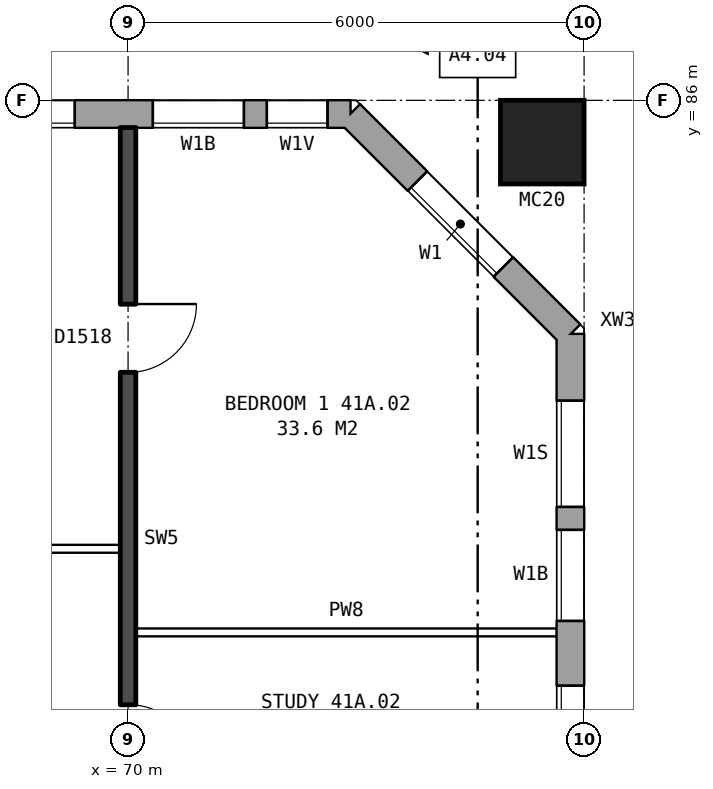
"""IFC4 building model, lengths in metres.
Left out: names, types, materials, properties, quantities, classifications, styles, units other than length and angle.
Written with IfcOpenShell. Run it as: python <this file> out.ifc"""

import sys

from ifc_helpers import new_model, si_unit, direction, frame, frame_2d, origin, origin_2d, place, context, subcontext, project, spatial, rectangle, hollow_rectangle, extrude, element, fill, save


model = new_model("IFC4")
c1 = context("Model", 3, precision=1e-05, world=origin(), true_north=direction((0.0, 1.0)))
c2 = subcontext(c1, "Body", "Model", "MODEL_VIEW")
j1 = project(units=[si_unit("LENGTHUNIT", "METRE"), si_unit("PLANEANGLEUNIT", "RADIAN")], contexts=[c1])
p1 = place(None, origin())
s1 = spatial("IfcSite", under=j1, at=p1, CompositionType="ELEMENT")
p2 = place(p1, origin())
s2 = spatial("IfcBuilding", under=s1, at=p2, CompositionType="ELEMENT")
p3 = place(p2, frame((0.0, 0.0, 148.5)))
s3 = spatial("IfcBuildingStorey", under=s2, at=p3, CompositionType="ELEMENT", Elevation=148.5)
p4 = place(p3, frame((75.45, 85.45, 0.0), z_axis=(0.0, 0.0, 1.0), x_axis=(1.0, 0.0, 0.0)))
e1 = element("IfcColumn", 1, at=p4, inside=s3, PredefinedType="COLUMN", context=c2, shape_type="SweptSolid", body=[
    extrude(hollow_rectangle(XDim=1.1, YDim=1.1, WallThickness=0.06, at=origin_2d()), origin(), (0.0, 0.0, 1.0), 3.1),
])
p5 = place(p3, frame((75.82, 57.075, 0.0), z_axis=(0.0, 0.0, 1.0), x_axis=(0.0, 1.0, 0.0)))
e2 = element("IfcWall", 2, at=p5, inside=s3, PredefinedType="STANDARD", context=c2, shape_type="SweptSolid", body=[
    extrude(rectangle(XDim=25.851, YDim=0.36, at=frame_2d((12.925, 0.0))), origin(), (0.0, 0.0, 1.0), 2.85),
])
p6 = place(p5, frame((1.375, 0.0, 0.8)))
e3 = element("IfcOpeningElement", 3, at=p6, cuts=e2, PredefinedType="OPENING", context=c2, shape_type="SweptSolid", body=[
    extrude(rectangle(XDim=1.0, YDim=1.2, at=frame_2d((0.5, 0.6))), frame((0.0, 0.19, 0.0), z_axis=(0.0, -1.0, 0.0), x_axis=(1.0, 0.0, 0.0)), (0.0, 0.0, 1.0), 0.38),
])
p7 = place(p5, frame((4.625, 0.0, 0.8)))
e4 = element("IfcOpeningElement", 4, at=p7, cuts=e2, PredefinedType="OPENING", context=c2, shape_type="SweptSolid", body=[
    extrude(rectangle(XDim=1.6, YDim=1.8, at=frame_2d((0.8, 0.9))), frame((0.0, 0.19, 0.0), z_axis=(0.0, -1.0, 0.0), x_axis=(1.0, 0.0, 0.0)), (0.0, 0.0, 1.0), 0.38),
])
p8 = place(p5, frame((19.625, 0.0, 0.8)))
e5 = element("IfcOpeningElement", 5, at=p8, cuts=e2, PredefinedType="OPENING", context=c2, shape_type="SweptSolid", body=[
    extrude(rectangle(XDim=1.6, YDim=1.8, at=frame_2d((0.8, 0.9))), frame((0.0, 0.19, 0.0), z_axis=(0.0, -1.0, 0.0), x_axis=(1.0, 0.0, 0.0)), (0.0, 0.0, 1.0), 0.38),
])
p9 = place(p5, frame((22.075, 0.0, 0.8)))
e6 = element("IfcOpeningElement", 6, at=p9, cuts=e2, PredefinedType="OPENING", context=c2, shape_type="SweptSolid", body=[
    extrude(rectangle(XDim=1.2, YDim=1.8, at=frame_2d((0.6, 0.9))), frame((0.0, 0.19, 0.0), z_axis=(0.0, -1.0, 0.0), x_axis=(1.0, 0.0, 0.0)), (0.0, 0.0, 1.0), 0.38),
])
p10 = place(p5, frame((2.675, 0.0, 0.8)))
e7 = element("IfcOpeningElement", 7, at=p10, cuts=e2, PredefinedType="OPENING", context=c2, shape_type="SweptSolid", body=[
    extrude(rectangle(XDim=1.4, YDim=1.8, at=frame_2d((0.7, 0.9))), frame((0.0, 0.19, 0.0), z_axis=(0.0, -1.0, 0.0), x_axis=(1.0, 0.0, 0.0)), (0.0, 0.0, 1.0), 0.38),
])
p11 = place(p5, frame((23.575, 0.0, 0.8)))
e8 = element("IfcOpeningElement", 8, at=p11, cuts=e2, PredefinedType="OPENING", context=c2, shape_type="SweptSolid", body=[
    extrude(rectangle(XDim=1.4, YDim=0.9, at=frame_2d((0.7, 0.45))), frame((0.0, 0.19, 0.0), z_axis=(0.0, -1.0, 0.0), x_axis=(1.0, 0.0, 0.0)), (0.0, 0.0, 1.0), 0.38),
])
p12 = place(p3, frame((75.82, 82.925, 0.0), z_axis=(0.0, 0.0, 1.0), x_axis=(-0.707106781187, 0.707106781187, 0.0)))
e9 = element("IfcWall", 9, at=p12, inside=s3, PredefinedType="STANDARD", context=c2, shape_type="SweptSolid", body=[
    extrude(rectangle(XDim=4.094, YDim=0.36, at=frame_2d((2.047, 0.0))), origin(), (0.0, 0.0, 1.0), 2.85),
])
p13 = place(p12, frame((1.247, 0.0, 0.8)))
e10 = element("IfcOpeningElement", 10, at=p13, cuts=e9, PredefinedType="OPENING", context=c2, shape_type="SweptSolid", body=[
    extrude(rectangle(XDim=1.6, YDim=1.8, at=frame_2d((0.8, 0.9))), frame((0.0, 0.19, 0.0), z_axis=(0.0, -1.0, 0.0), x_axis=(1.0, 0.0, 0.0)), (0.0, 0.0, 1.0), 0.38),
])
p14 = place(p3, frame((72.925, 85.82, 0.0), z_axis=(0.0, 0.0, 1.0), x_axis=(-1.0, 0.0, 0.0)))
e11 = element("IfcWall", 11, at=p14, inside=s3, PredefinedType="STANDARD", context=c2, shape_type="SweptSolid", body=[
    extrude(rectangle(XDim=41.351, YDim=0.36, at=frame_2d((20.675, 0.0))), origin(), (0.0, 0.0, 1.0), 2.85),
])
p15 = place(p14, frame((0.3, 0.0, 0.8)))
e12 = element("IfcOpeningElement", 12, at=p15, cuts=e11, PredefinedType="OPENING", context=c2, shape_type="SweptSolid", body=[
    extrude(rectangle(XDim=0.8, YDim=0.9, at=frame_2d((0.4, 0.45))), frame((0.0, 0.19, 0.0), z_axis=(0.0, -1.0, 0.0), x_axis=(1.0, 0.0, 0.0)), (0.0, 0.0, 1.0), 0.38),
])
p16 = place(p14, frame((3.625, 0.0, 0.8)))
e13 = element("IfcOpeningElement", 13, at=p16, cuts=e11, PredefinedType="OPENING", context=c2, shape_type="SweptSolid", body=[
    extrude(rectangle(XDim=1.6, YDim=1.8, at=frame_2d((0.8, 0.9))), frame((0.0, 0.19, 0.0), z_axis=(0.0, -1.0, 0.0), x_axis=(1.0, 0.0, 0.0)), (0.0, 0.0, 1.0), 0.38),
])
p17 = place(p14, frame((6.625, 0.0, 0.8)))
e14 = element("IfcOpeningElement", 14, at=p17, cuts=e11, PredefinedType="OPENING", context=c2, shape_type="SweptSolid", body=[
    extrude(rectangle(XDim=1.6, YDim=1.8, at=frame_2d((0.8, 0.9))), frame((0.0, 0.19, 0.0), z_axis=(0.0, -1.0, 0.0), x_axis=(1.0, 0.0, 0.0)), (0.0, 0.0, 1.0), 0.38),
])
p18 = place(p14, frame((9.625, 0.0, 0.8)))
e15 = element("IfcOpeningElement", 15, at=p18, cuts=e11, PredefinedType="OPENING", context=c2, shape_type="SweptSolid", body=[
    extrude(rectangle(XDim=1.6, YDim=1.8, at=frame_2d((0.8, 0.9))), frame((0.0, 0.19, 0.0), z_axis=(0.0, -1.0, 0.0), x_axis=(1.0, 0.0, 0.0)), (0.0, 0.0, 1.0), 0.38),
])
p19 = place(p14, frame((12.625, 0.0, 0.8)))
e16 = element("IfcOpeningElement", 16, at=p19, cuts=e11, PredefinedType="OPENING", context=c2, shape_type="SweptSolid", body=[
    extrude(rectangle(XDim=1.6, YDim=1.8, at=frame_2d((0.8, 0.9))), frame((0.0, 0.19, 0.0), z_axis=(0.0, -1.0, 0.0), x_axis=(1.0, 0.0, 0.0)), (0.0, 0.0, 1.0), 0.38),
])
p20 = place(p14, frame((15.625, 0.0, 0.8)))
e17 = element("IfcOpeningElement", 17, at=p20, cuts=e11, PredefinedType="OPENING", context=c2, shape_type="SweptSolid", body=[
    extrude(rectangle(XDim=1.6, YDim=1.8, at=frame_2d((0.8, 0.9))), frame((0.0, 0.19, 0.0), z_axis=(0.0, -1.0, 0.0), x_axis=(1.0, 0.0, 0.0)), (0.0, 0.0, 1.0), 0.38),
])
p21 = place(p14, frame((18.625, 0.0, 0.8)))
e18 = element("IfcOpeningElement", 18, at=p21, cuts=e11, PredefinedType="OPENING", context=c2, shape_type="SweptSolid", body=[
    extrude(rectangle(XDim=1.6, YDim=1.8, at=frame_2d((0.8, 0.9))), frame((0.0, 0.19, 0.0), z_axis=(0.0, -1.0, 0.0), x_axis=(1.0, 0.0, 0.0)), (0.0, 0.0, 1.0), 0.38),
])
p22 = place(p14, frame((21.625, 0.0, 0.8)))
e19 = element("IfcOpeningElement", 19, at=p22, cuts=e11, PredefinedType="OPENING", context=c2, shape_type="SweptSolid", body=[
    extrude(rectangle(XDim=1.6, YDim=1.8, at=frame_2d((0.8, 0.9))), frame((0.0, 0.19, 0.0), z_axis=(0.0, -1.0, 0.0), x_axis=(1.0, 0.0, 0.0)), (0.0, 0.0, 1.0), 0.38),
])
p23 = place(p14, frame((24.625, 0.0, 0.8)))
e20 = element("IfcOpeningElement", 20, at=p23, cuts=e11, PredefinedType="OPENING", context=c2, shape_type="SweptSolid", body=[
    extrude(rectangle(XDim=1.6, YDim=1.8, at=frame_2d((0.8, 0.9))), frame((0.0, 0.19, 0.0), z_axis=(0.0, -1.0, 0.0), x_axis=(1.0, 0.0, 0.0)), (0.0, 0.0, 1.0), 0.38),
])
p24 = place(p14, frame((27.625, 0.0, 0.8)))
e21 = element("IfcOpeningElement", 21, at=p24, cuts=e11, PredefinedType="OPENING", context=c2, shape_type="SweptSolid", body=[
    extrude(rectangle(XDim=1.6, YDim=1.8, at=frame_2d((0.8, 0.9))), frame((0.0, 0.19, 0.0), z_axis=(0.0, -1.0, 0.0), x_axis=(1.0, 0.0, 0.0)), (0.0, 0.0, 1.0), 0.38),
])
p25 = place(p14, frame((30.625, 0.0, 0.8)))
e22 = element("IfcOpeningElement", 22, at=p25, cuts=e11, PredefinedType="OPENING", context=c2, shape_type="SweptSolid", body=[
    extrude(rectangle(XDim=1.6, YDim=1.8, at=frame_2d((0.8, 0.9))), frame((0.0, 0.19, 0.0), z_axis=(0.0, -1.0, 0.0), x_axis=(1.0, 0.0, 0.0)), (0.0, 0.0, 1.0), 0.38),
])
p26 = place(p14, frame((33.625, 0.0, 0.8)))
e23 = element("IfcOpeningElement", 23, at=p26, cuts=e11, PredefinedType="OPENING", context=c2, shape_type="SweptSolid", body=[
    extrude(rectangle(XDim=1.6, YDim=1.8, at=frame_2d((0.8, 0.9))), frame((0.0, 0.19, 0.0), z_axis=(0.0, -1.0, 0.0), x_axis=(1.0, 0.0, 0.0)), (0.0, 0.0, 1.0), 0.38),
])
p27 = place(p14, frame((36.625, 0.0, 0.8)))
e24 = element("IfcOpeningElement", 24, at=p27, cuts=e11, PredefinedType="OPENING", context=c2, shape_type="SweptSolid", body=[
    extrude(rectangle(XDim=1.6, YDim=1.8, at=frame_2d((0.8, 0.9))), frame((0.0, 0.19, 0.0), z_axis=(0.0, -1.0, 0.0), x_axis=(1.0, 0.0, 0.0)), (0.0, 0.0, 1.0), 0.38),
])
p28 = place(p14, frame((1.4, 0.0, 0.8)))
e25 = element("IfcOpeningElement", 25, at=p28, cuts=e11, PredefinedType="OPENING", context=c2, shape_type="SweptSolid", body=[
    extrude(rectangle(XDim=1.2, YDim=1.8, at=frame_2d((0.6, 0.9))), frame((0.0, 0.19, 0.0), z_axis=(0.0, -1.0, 0.0), x_axis=(1.0, 0.0, 0.0)), (0.0, 0.0, 1.0), 0.38),
])
p29 = place(p3, frame((70.1, 79.0, 0.0), z_axis=(0.0, 0.0, 1.0), x_axis=(1.0, 0.0, 0.0)))
e26 = element("IfcWall", 26, at=p29, inside=s3, PredefinedType="PARTITIONING", context=c2, shape_type="SweptSolid", body=[
    extrude(rectangle(XDim=5.54, YDim=0.1, at=frame_2d((2.77, 0.0))), origin(), (0.0, 0.0, 1.0), 2.85),
])
p30 = place(p3, frame((64.1, 80.1, 0.0), z_axis=(0.0, 0.0, 1.0), x_axis=(1.0, 0.0, 0.0)))
e27 = element("IfcWall", 27, at=p30, inside=s3, PredefinedType="PARTITIONING", context=c2, shape_type="SweptSolid", body=[
    extrude(rectangle(XDim=5.8, YDim=0.1, at=frame_2d((2.9, 0.0))), origin(), (0.0, 0.0, 1.0), 2.85),
])
p31 = place(p30, frame((3.6, 0.0, 0.0)))
e28 = element("IfcOpeningElement", 28, at=p31, cuts=e27, PredefinedType="OPENING", context=c2, shape_type="SweptSolid", body=[
    extrude(rectangle(XDim=0.9, YDim=2.1, at=frame_2d((0.45, 1.05))), frame((0.0, 0.06, 0.0), z_axis=(0.0, -1.0, 0.0), x_axis=(1.0, 0.0, 0.0)), (0.0, 0.0, 1.0), 0.12),
])
p32 = place(p30, frame((0.7, 0.0, 0.0)))
e29 = element("IfcOpeningElement", 29, at=p32, cuts=e27, PredefinedType="OPENING", context=c2, shape_type="SweptSolid", body=[
    extrude(rectangle(XDim=0.9, YDim=2.1, at=frame_2d((0.45, 1.05))), frame((0.0, 0.06, 0.0), z_axis=(0.0, -1.0, 0.0), x_axis=(1.0, 0.0, 0.0)), (0.0, 0.0, 1.0), 0.12),
])
p33 = place(p3, frame((70.0, 76.2, 0.0), z_axis=(0.0, 0.0, 1.0), x_axis=(0.0, 1.0, 0.0)))
e30 = element("IfcWall", 30, at=p33, inside=s3, PredefinedType="SOLIDWALL", context=c2, shape_type="SweptSolid", body=[
    extrude(rectangle(XDim=9.44, YDim=0.2, at=frame_2d((4.72, 0.0))), origin(), (0.0, 0.0, 1.0), 2.85),
])
p34 = place(p33, frame((6.22, 0.0, 0.0)))
e31 = element("IfcOpeningElement", 31, at=p34, cuts=e30, PredefinedType="OPENING", context=c2, shape_type="SweptSolid", body=[
    extrude(rectangle(XDim=0.9, YDim=2.1, at=frame_2d((0.45, 1.05))), frame((0.0, 0.11, 0.0), z_axis=(0.0, -1.0, 0.0), x_axis=(1.0, 0.0, 0.0)), (0.0, 0.0, 1.0), 0.22),
])
p35 = place(p33, frame((0.95, 0.0, 0.0)))
e32 = element("IfcOpeningElement", 32, at=p35, cuts=e30, PredefinedType="OPENING", context=c2, shape_type="SweptSolid", body=[
    extrude(rectangle(XDim=0.9, YDim=2.1, at=frame_2d((0.45, 1.05))), frame((0.0, 0.11, 0.0), z_axis=(0.0, -1.0, 0.0), x_axis=(1.0, 0.0, 0.0)), (0.0, 0.0, 1.0), 0.22),
])
p36 = place(p8, origin())
e33 = element("IfcWindow", 33, at=p36, inside=s3, PartitioningType="SINGLE_PANEL", PredefinedType="WINDOW", context=c2, shape_type="SweptSolid", body=[
    extrude(rectangle(XDim=1.6, YDim=1.8, at=frame_2d((0.8, 0.9))), frame((0.0, 0.15, 0.0), z_axis=(0.0, -1.0, 0.0), x_axis=(1.0, 0.0, 0.0)), (0.0, 0.0, 1.0), 0.06),
])
fill(e5, e33)
p37 = place(p9, origin())
e34 = element("IfcWindow", 34, at=p37, inside=s3, PartitioningType="SINGLE_PANEL", PredefinedType="WINDOW", context=c2, shape_type="SweptSolid", body=[
    extrude(rectangle(XDim=1.2, YDim=1.8, at=frame_2d((0.6, 0.9))), frame((0.0, 0.15, 0.0), z_axis=(0.0, -1.0, 0.0), x_axis=(1.0, 0.0, 0.0)), (0.0, 0.0, 1.0), 0.06),
])
fill(e6, e34)
p38 = place(p13, origin())
e35 = element("IfcWindow", 35, at=p38, inside=s3, PartitioningType="SINGLE_PANEL", PredefinedType="WINDOW", context=c2, shape_type="SweptSolid", body=[
    extrude(rectangle(XDim=1.6, YDim=1.8, at=frame_2d((0.8, 0.9))), frame((0.0, 0.15, 0.0), z_axis=(0.0, -1.0, 0.0), x_axis=(1.0, 0.0, 0.0)), (0.0, 0.0, 1.0), 0.06),
])
fill(e10, e35)
p39 = place(p15, origin())
e36 = element("IfcWindow", 36, at=p39, inside=s3, PartitioningType="SINGLE_PANEL", PredefinedType="WINDOW", context=c2, shape_type="SweptSolid", body=[
    extrude(rectangle(XDim=0.8, YDim=0.9, at=frame_2d((0.4, 0.45))), frame((0.0, 0.15, 0.0), z_axis=(0.0, -1.0, 0.0), x_axis=(1.0, 0.0, 0.0)), (0.0, 0.0, 1.0), 0.06),
])
fill(e12, e36)
p40 = place(p16, origin())
e37 = element("IfcWindow", 37, at=p40, inside=s3, PartitioningType="SINGLE_PANEL", PredefinedType="WINDOW", context=c2, shape_type="SweptSolid", body=[
    extrude(rectangle(XDim=1.6, YDim=1.8, at=frame_2d((0.8, 0.9))), frame((0.0, 0.15, 0.0), z_axis=(0.0, -1.0, 0.0), x_axis=(1.0, 0.0, 0.0)), (0.0, 0.0, 1.0), 0.06),
])
fill(e13, e37)
p41 = place(p34, frame((0.9, 0.0, 0.0), z_axis=(0.0, 0.0, 1.0), x_axis=(-1.0, 0.0, 0.0)))
e38 = element("IfcDoor", 38, at=p41, inside=s3, OperationType="SINGLE_SWING_LEFT", PredefinedType="DOOR", context=c2, shape_type="SweptSolid", body=[
    extrude(rectangle(XDim=0.9, YDim=2.1, at=frame_2d((0.45, 1.05))), frame((0.0, 0.025, 0.0), z_axis=(0.0, -1.0, 0.0), x_axis=(1.0, 0.0, 0.0)), (0.0, 0.0, 1.0), 0.05),
])
fill(e31, e38)
p42 = place(p35, frame((0.9, 0.0, 0.0), z_axis=(0.0, 0.0, 1.0), x_axis=(-1.0, 0.0, 0.0)))
e39 = element("IfcDoor", 39, at=p42, inside=s3, OperationType="SINGLE_SWING_RIGHT", PredefinedType="DOOR", context=c2, shape_type="SweptSolid", body=[
    extrude(rectangle(XDim=0.9, YDim=2.1, at=frame_2d((0.45, 1.05))), frame((0.0, 0.025, 0.0), z_axis=(0.0, -1.0, 0.0), x_axis=(1.0, 0.0, 0.0)), (0.0, 0.0, 1.0), 0.05),
])
fill(e32, e39)
p43 = place(p11, origin())
e40 = element("IfcWindow", 40, at=p43, inside=s3, PartitioningType="SINGLE_PANEL", PredefinedType="WINDOW", context=c2, shape_type="SweptSolid", body=[
    extrude(rectangle(XDim=1.4, YDim=0.9, at=frame_2d((0.7, 0.45))), frame((0.0, 0.15, 0.0), z_axis=(0.0, -1.0, 0.0), x_axis=(1.0, 0.0, 0.0)), (0.0, 0.0, 1.0), 0.06),
])
fill(e8, e40)
p44 = place(p28, origin())
e41 = element("IfcWindow", 41, at=p44, inside=s3, PartitioningType="SINGLE_PANEL", PredefinedType="WINDOW", context=c2, shape_type="SweptSolid", body=[
    extrude(rectangle(XDim=1.2, YDim=1.8, at=frame_2d((0.6, 0.9))), frame((0.0, 0.15, 0.0), z_axis=(0.0, -1.0, 0.0), x_axis=(1.0, 0.0, 0.0)), (0.0, 0.0, 1.0), 0.06),
])
fill(e25, e41)
save(model, sys.argv[1])
